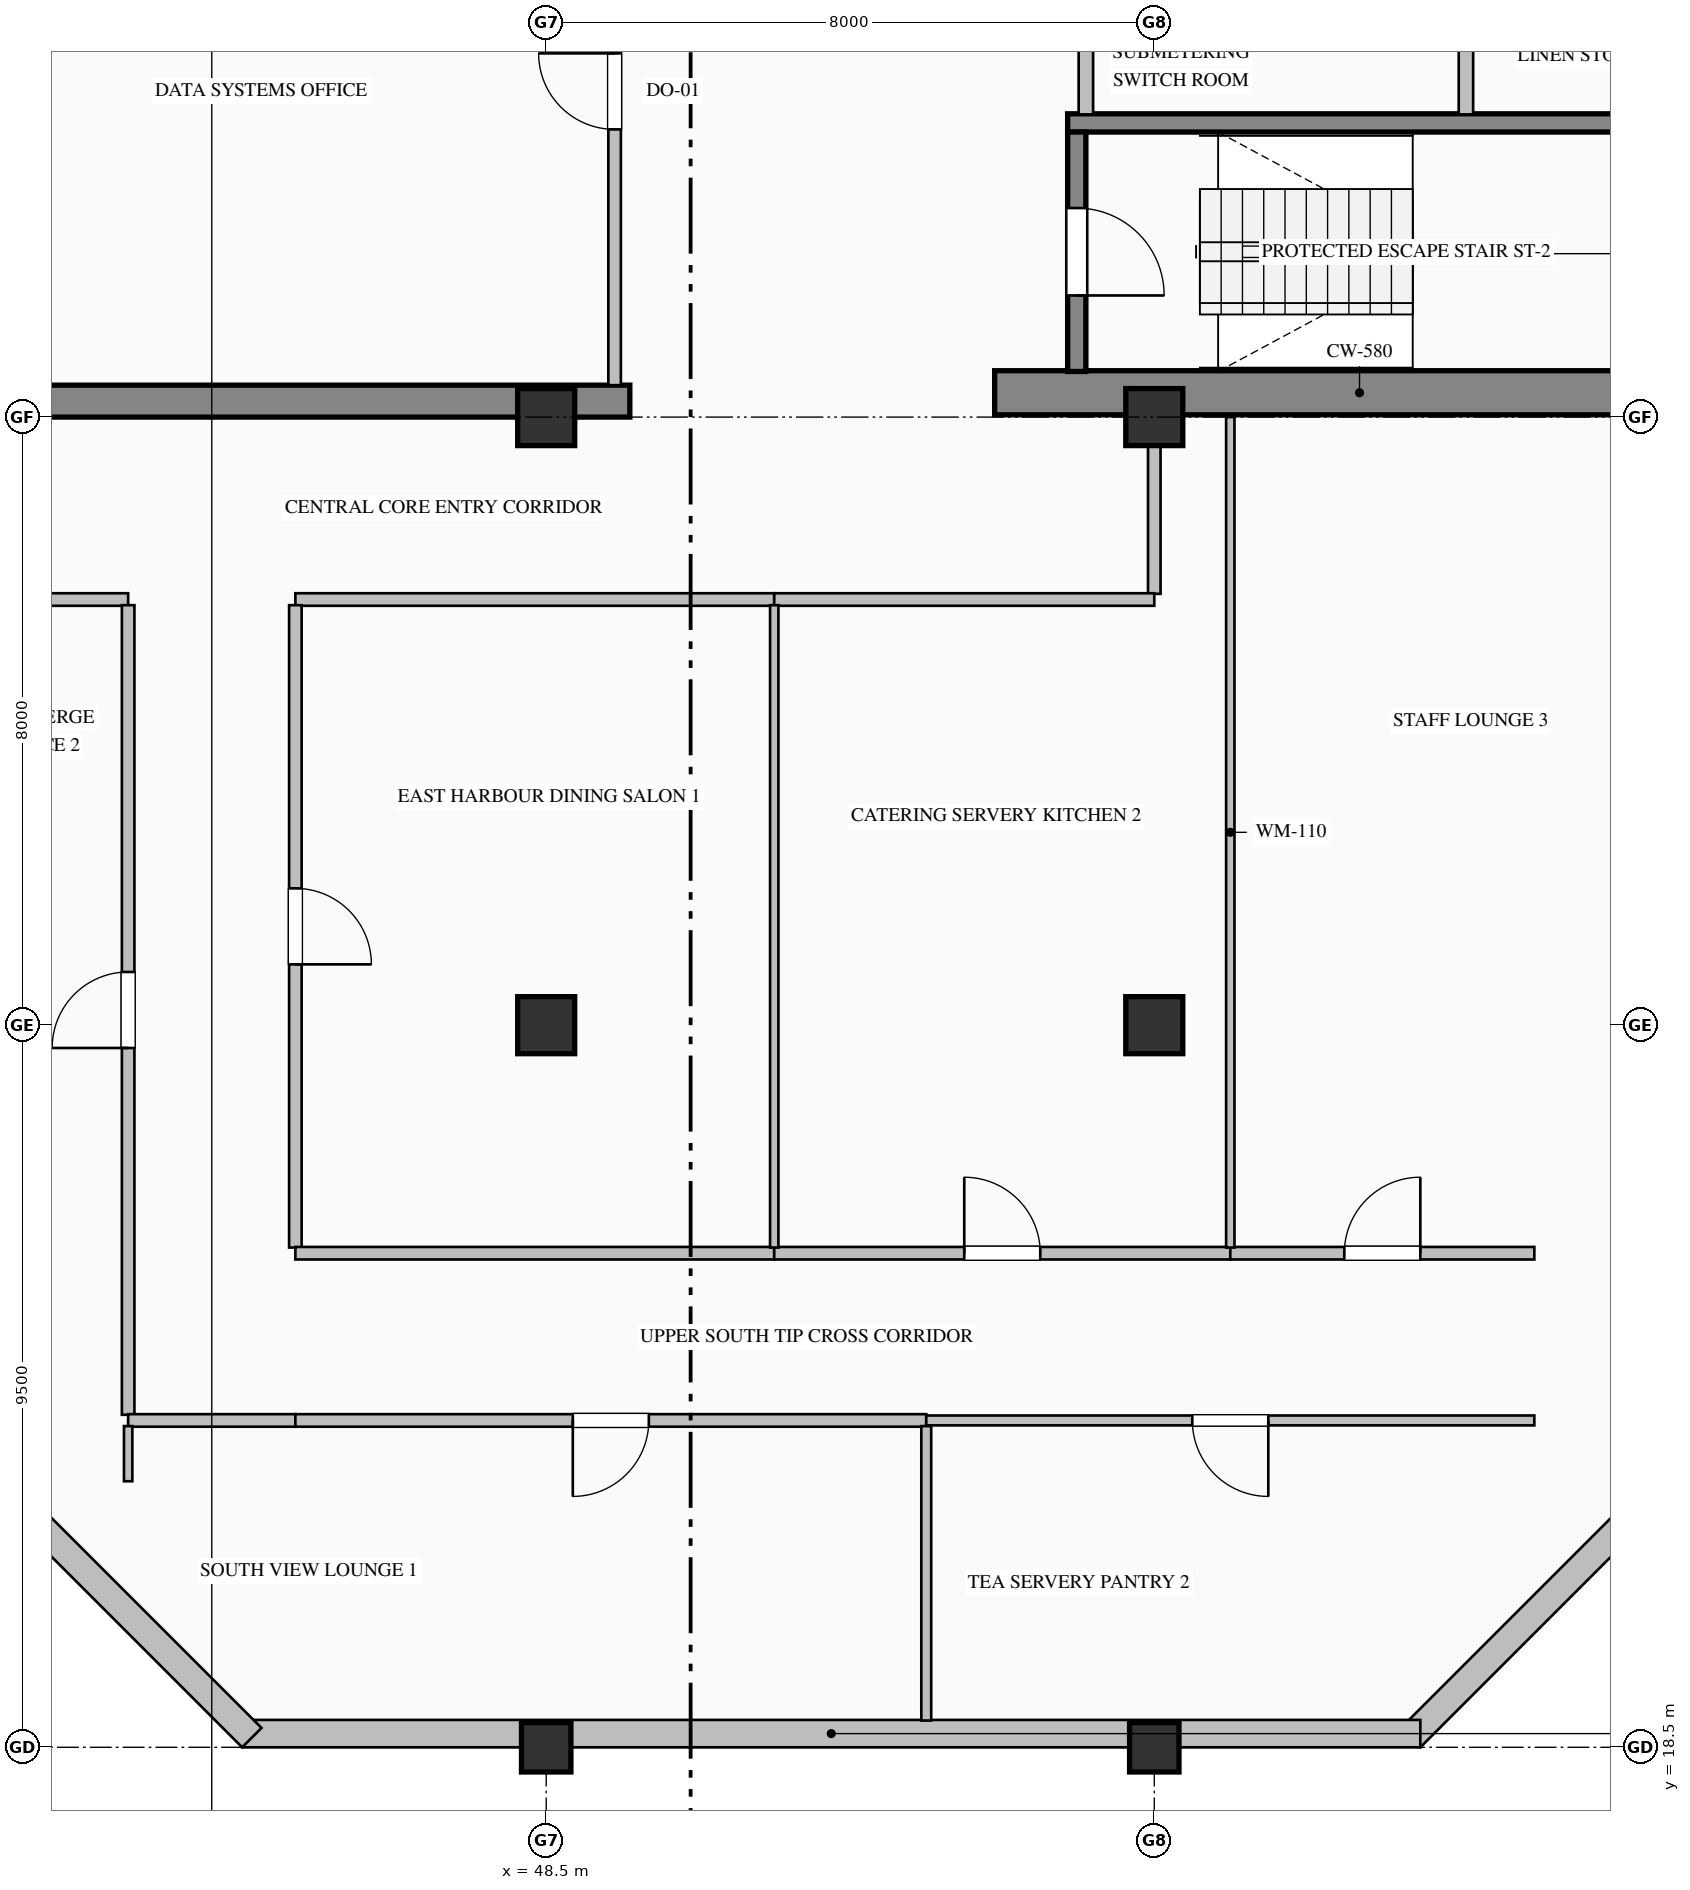
"""IFC4 building model, lengths in metres.
Left out: names, types, materials, properties, quantities, classifications, styles, units other than length and angle.
Written with IfcOpenShell. Run it as: python <this file> out.ifc"""

import sys

from ifc_helpers import new_model, si_unit, direction, frame, frame_2d, origin, origin_2d, place, context, subcontext, project, spatial, rectangle, hollow_rectangle, extrude, element, fill, save


model = new_model("IFC4")
c1 = context("Model", 3, precision=1e-05, world=origin(), true_north=direction((0.0, 1.0)))
c2 = subcontext(c1, "Body", "Model", "MODEL_VIEW")
j1 = project(units=[si_unit("LENGTHUNIT", "METRE"), si_unit("PLANEANGLEUNIT", "RADIAN")], contexts=[c1])
p1 = place(None, origin())
s1 = spatial("IfcSite", under=j1, at=p1, CompositionType="ELEMENT")
p2 = place(p1, origin())
s2 = spatial("IfcBuilding", under=s1, at=p2, CompositionType="ELEMENT")
p3 = place(p2, frame((0.0, 0.0, 327.2)))
s3 = spatial("IfcBuildingStorey", under=s2, at=p3, CompositionType="ELEMENT", Elevation=327.2)
p4 = place(p3, frame((40.5, 36.21, 0.0), z_axis=(0.0, 0.0, 1.0), x_axis=(1.0, 0.0, 0.0)))
e1 = element("IfcWall", 1, at=p4, inside=s3, PredefinedType="SHEAR", context=c2, shape_type="SweptSolid", body=[
    extrude(rectangle(XDim=9.1, YDim=0.42, at=frame_2d((4.55, 0.0))), origin(), (0.0, 0.0, 1.0), 3.785),
])
p5 = place(p3, frame((54.4, 36.32, 0.0), z_axis=(0.0, 0.0, 1.0), x_axis=(1.0, 0.0, 0.0)))
e2 = element("IfcWall", 2, at=p5, inside=s3, PredefinedType="SHEAR", context=c2, shape_type="SweptSolid", body=[
    extrude(rectangle(XDim=9.6, YDim=0.58, at=frame_2d((4.8, 0.0))), origin(), (0.0, 0.0, 1.0), 4.0),
])
p6 = place(p3, frame((48.5, 18.5, 0.0), z_axis=(0.0, 0.0, 1.0), x_axis=(1.0, 0.0, 0.0)))
e3 = element("IfcColumn", 3, at=p6, inside=s3, PredefinedType="COLUMN", context=c2, shape_type="SweptSolid", body=[
    extrude(hollow_rectangle(XDim=0.65, YDim=0.65, WallThickness=0.028, at=origin_2d()), origin(), (0.0, 0.0, 1.0), 4.0),
])
for number, where, z_axis, x_axis in (
    (4, (48.5, 28.0, 0.0), (0.0, 0.0, 1.0), (1.0, 0.0, 0.0)),
    (5, (48.5, 36.0, 0.0), (0.0, 0.0, 1.0), (1.0, 0.0, 0.0)),
):
    element("IfcColumn", number, at=place(p3, frame(where, z_axis=z_axis, x_axis=x_axis)), inside=s3, PredefinedType="COLUMN", context=c2, shape_type="SweptSolid", body=[
        extrude(rectangle(XDim=0.75, YDim=0.75, at=origin_2d()), origin(), (0.0, 0.0, 1.0), 4.0),
    ])
p7 = place(p3, frame((56.5, 18.5, 0.0), z_axis=(0.0, 0.0, 1.0), x_axis=(1.0, 0.0, 0.0)))
e6 = element("IfcColumn", 6, at=p7, inside=s3, PredefinedType="COLUMN", context=c2, shape_type="SweptSolid", body=[
    extrude(hollow_rectangle(XDim=0.65, YDim=0.65, WallThickness=0.028, at=origin_2d()), origin(), (0.0, 0.0, 1.0), 4.0),
])
for number, where, z_axis, x_axis in (
    (7, (56.5, 28.0, 0.0), (0.0, 0.0, 1.0), (1.0, 0.0, 0.0)),
    (8, (56.5, 36.0, 0.0), (0.0, 0.0, 1.0), (1.0, 0.0, 0.0)),
):
    element("IfcColumn", number, at=place(p3, frame(where, z_axis=z_axis, x_axis=x_axis)), inside=s3, PredefinedType="COLUMN", context=c2, shape_type="SweptSolid", body=[
        extrude(rectangle(XDim=0.75, YDim=0.75, at=origin_2d()), origin(), (0.0, 0.0, 1.0), 4.0),
    ])
p8 = place(p3, frame((63.873, 22.627, 0.0), z_axis=(0.0, 0.0, 1.0), x_axis=(-0.707106781187, -0.707106781187, 0.0)))
e9 = element("IfcWall", 9, at=p8, inside=s3, PredefinedType="SOLIDWALL", context=c2, shape_type="SweptSolid", body=[
    extrude(rectangle(XDim=5.657, YDim=0.36, at=frame_2d((2.828, 0.0))), origin(), (0.0, 0.0, 1.0), 3.785),
])
p9 = place(p3, frame((60.0, 18.68, 0.0), z_axis=(0.0, 0.0, 1.0), x_axis=(-1.0, 0.0, 0.0)))
e10 = element("IfcWall", 10, at=p9, inside=s3, PredefinedType="SOLIDWALL", context=c2, shape_type="SweptSolid", body=[
    extrude(rectangle(XDim=15.5, YDim=0.36, at=frame_2d((7.75, 0.0))), origin(), (0.0, 0.0, 1.0), 3.335),
])
p10 = place(p3, frame((44.627, 18.627, 0.0), z_axis=(0.0, 0.0, 1.0), x_axis=(-0.707106781187, 0.707106781187, 0.0)))
e11 = element("IfcWall", 11, at=p10, inside=s3, PredefinedType="SOLIDWALL", context=c2, shape_type="SweptSolid", body=[
    extrude(rectangle(XDim=5.657, YDim=0.36, at=frame_2d((2.828, 0.0))), origin(), (0.0, 0.0, 1.0), 3.785),
])
p11 = place(p3, frame((55.36, 39.87, 0.0), z_axis=(0.0, 0.0, 1.0), x_axis=(1.0, 0.0, 0.0)))
e12 = element("IfcWall", 12, at=p11, inside=s3, PredefinedType="SOLIDWALL", context=c2, shape_type="SweptSolid", body=[
    extrude(rectangle(XDim=8.08, YDim=0.24, at=frame_2d((4.04, 0.0))), origin(), (0.0, 0.0, 1.0), 4.0),
])
p12 = place(p3, frame((55.48, 39.75, 0.0), z_axis=(0.0, 0.0, 1.0), x_axis=(0.0, -1.0, 0.0)))
e13 = element("IfcWall", 13, at=p12, inside=s3, PredefinedType="SOLIDWALL", context=c2, shape_type="SweptSolid", body=[
    extrude(rectangle(XDim=3.15, YDim=0.24, at=frame_2d((1.575, 0.0))), origin(), (0.0, 0.0, 1.0), 4.0),
])
p13 = place(p12, frame((1.0, 0.0, 0.0)))
e14 = element("IfcOpeningElement", 14, at=p13, cuts=e13, PredefinedType="OPENING", context=c2, shape_type="SweptSolid", body=[
    extrude(rectangle(XDim=1.15, YDim=2.2, at=frame_2d((0.575, 1.1))), frame((0.0, 0.13, 0.0), z_axis=(0.0, -1.0, 0.0), x_axis=(1.0, 0.0, 0.0)), (0.0, 0.0, 1.0), 0.26),
])
p14 = place(p3, frame((49.4, 36.42, 0.0), z_axis=(0.0, 0.0, 1.0), x_axis=(0.0, 1.0, 0.0)))
e15 = element("IfcWall", 15, at=p14, inside=s3, PredefinedType="PARTITIONING", context=c2, shape_type="SweptSolid", body=[
    extrude(rectangle(XDim=7.73, YDim=0.165, at=frame_2d((3.865, 0.0))), origin(), (0.0, 0.0, 1.0), 3.027),
])
p15 = place(p14, frame((3.365, 0.0, 0.0)))
e16 = element("IfcOpeningElement", 16, at=p15, cuts=e15, PredefinedType="OPENING", context=c2, shape_type="SweptSolid", body=[
    extrude(rectangle(XDim=1.0, YDim=2.15, at=frame_2d((0.5, 1.075))), frame((0.0, 0.093, 0.0), z_axis=(0.0, -1.0, 0.0), x_axis=(1.0, 0.0, 0.0)), (0.0, 0.0, 1.0), 0.185),
])
for number, where, z_axis, x_axis in (
    (17, (55.6, 42.713, 0.0), (0.0, 0.0, 1.0), (0.0, -1.0, 0.0)),
    (18, (60.6, 42.713, 0.0), (0.0, 0.0, 1.0), (0.0, -1.0, 0.0)),
):
    element("IfcWall", number, at=place(p3, frame(where, z_axis=z_axis, x_axis=x_axis)), inside=s3, PredefinedType="PARTITIONING", context=c2, shape_type="SweptSolid", body=[
        extrude(rectangle(XDim=2.731, YDim=0.19, at=frame_2d((1.365, 0.0))), origin(), (0.0, 0.0, 1.0), 3.785),
    ])
p16 = place(p3, frame((51.5, 33.6, 0.0), z_axis=(0.0, 0.0, 1.0), x_axis=(-1.0, 0.0, 0.0)))
e19 = element("IfcWall", 19, at=p16, inside=s3, PredefinedType="PARTITIONING", context=c2, shape_type="SweptSolid", body=[
    extrude(rectangle(XDim=6.3, YDim=0.165, at=frame_2d((3.15, 0.0))), origin(), (0.0, 0.0, 1.0), 3.785),
])
p17 = place(p3, frame((56.5, 36.0, 0.0), z_axis=(0.0, 0.0, 1.0), x_axis=(0.0, -1.0, 0.0)))
e20 = element("IfcWall", 20, at=p17, inside=s3, PredefinedType="PARTITIONING", context=c2, shape_type="SweptSolid", body=[
    extrude(rectangle(XDim=2.325, YDim=0.165, at=frame_2d((1.163, 0.0))), origin(), (0.0, 0.0, 1.0), 3.177),
])
p18 = place(p3, frame((56.5, 33.6, 0.0), z_axis=(0.0, 0.0, 1.0), x_axis=(-1.0, 0.0, 0.0)))
e21 = element("IfcWall", 21, at=p18, inside=s3, PredefinedType="PARTITIONING", context=c2, shape_type="SweptSolid", body=[
    extrude(rectangle(XDim=5.0, YDim=0.165, at=frame_2d((2.5, 0.0))), origin(), (0.0, 0.0, 1.0), 3.785),
])
p19 = place(p3, frame((43.0, 33.6, 0.0), z_axis=(0.0, 0.0, 1.0), x_axis=(-1.0, 0.0, 0.0)))
e22 = element("IfcWall", 22, at=p19, inside=s3, PredefinedType="PARTITIONING", context=c2, shape_type="SweptSolid", body=[
    extrude(rectangle(XDim=2.5, YDim=0.165, at=frame_2d((1.25, 0.0))), origin(), (0.0, 0.0, 1.0), 3.785),
])
p20 = place(p3, frame((45.2, 33.525, 0.0), z_axis=(0.0, 0.0, 1.0), x_axis=(0.0, -1.0, 0.0)))
e23 = element("IfcWall", 23, at=p20, inside=s3, PredefinedType="PARTITIONING", context=c2, shape_type="SweptSolid", body=[
    extrude(rectangle(XDim=8.451, YDim=0.165, at=frame_2d((4.226, 0.0))), origin(), (0.0, 0.0, 1.0), 3.785),
])
p21 = place(p20, frame((3.726, 0.0, 0.0)))
e24 = element("IfcOpeningElement", 24, at=p21, cuts=e23, PredefinedType="OPENING", context=c2, shape_type="SweptSolid", body=[
    extrude(rectangle(XDim=1.0, YDim=2.15, at=frame_2d((0.5, 1.075))), frame((0.0, 0.093, 0.0), z_axis=(0.0, -1.0, 0.0), x_axis=(1.0, 0.0, 0.0)), (0.0, 0.0, 1.0), 0.185),
])
p22 = place(p3, frame((43.0, 22.875, 0.0), z_axis=(0.0, 0.0, 1.0), x_axis=(0.0, 1.0, 0.0)))
e25 = element("IfcWall", 25, at=p22, inside=s3, PredefinedType="PARTITIONING", context=c2, shape_type="SweptSolid", body=[
    extrude(rectangle(XDim=10.651, YDim=0.165, at=frame_2d((5.325, 0.0))), origin(), (0.0, 0.0, 1.0), 3.785),
])
p23 = place(p22, frame((4.825, 0.0, 0.0)))
e26 = element("IfcOpeningElement", 26, at=p23, cuts=e25, PredefinedType="OPENING", context=c2, shape_type="SweptSolid", body=[
    extrude(rectangle(XDim=1.0, YDim=2.15, at=frame_2d((0.5, 1.075))), frame((0.0, 0.093, 0.0), z_axis=(0.0, -1.0, 0.0), x_axis=(1.0, 0.0, 0.0)), (0.0, 0.0, 1.0), 0.185),
])
p24 = place(p3, frame((45.2, 22.8, 0.0), z_axis=(0.0, 0.0, 1.0), x_axis=(-1.0, 0.0, 0.0)))
e27 = element("IfcWall", 27, at=p24, inside=s3, PredefinedType="PARTITIONING", context=c2, shape_type="SweptSolid", body=[
    extrude(rectangle(XDim=2.2, YDim=0.165, at=frame_2d((1.1, 0.0))), origin(), (0.0, 0.0, 1.0), 3.785),
])
p25 = place(p3, frame((45.2, 25.0, 0.0), z_axis=(0.0, 0.0, 1.0), x_axis=(1.0, 0.0, 0.0)))
e28 = element("IfcWall", 28, at=p25, inside=s3, PredefinedType="PARTITIONING", context=c2, shape_type="SweptSolid", body=[
    extrude(rectangle(XDim=6.3, YDim=0.165, at=frame_2d((3.15, 0.0))), origin(), (0.0, 0.0, 1.0), 3.785),
])
p26 = place(p3, frame((51.5, 25.0, 0.0), z_axis=(0.0, 0.0, 1.0), x_axis=(1.0, 0.0, 0.0)))
e29 = element("IfcWall", 29, at=p26, inside=s3, PredefinedType="PARTITIONING", context=c2, shape_type="SweptSolid", body=[
    extrude(rectangle(XDim=6.0, YDim=0.165, at=frame_2d((3.0, 0.0))), origin(), (0.0, 0.0, 1.0), 3.785),
])
p27 = place(p26, frame((2.5, 0.0, 0.0)))
e30 = element("IfcOpeningElement", 30, at=p27, cuts=e29, PredefinedType="OPENING", context=c2, shape_type="SweptSolid", body=[
    extrude(rectangle(XDim=1.0, YDim=2.15, at=frame_2d((0.5, 1.075))), frame((0.0, 0.093, 0.0), z_axis=(0.0, -1.0, 0.0), x_axis=(1.0, 0.0, 0.0)), (0.0, 0.0, 1.0), 0.185),
])
p28 = place(p3, frame((57.5, 25.0, 0.0), z_axis=(0.0, 0.0, 1.0), x_axis=(1.0, 0.0, 0.0)))
e31 = element("IfcWall", 31, at=p28, inside=s3, PredefinedType="PARTITIONING", context=c2, shape_type="SweptSolid", body=[
    extrude(rectangle(XDim=4.0, YDim=0.165, at=frame_2d((2.0, 0.0))), origin(), (0.0, 0.0, 1.0), 3.785),
])
p29 = place(p28, frame((1.5, 0.0, 0.0)))
e32 = element("IfcOpeningElement", 32, at=p29, cuts=e31, PredefinedType="OPENING", context=c2, shape_type="SweptSolid", body=[
    extrude(rectangle(XDim=1.0, YDim=2.15, at=frame_2d((0.5, 1.075))), frame((0.0, 0.093, 0.0), z_axis=(0.0, -1.0, 0.0), x_axis=(1.0, 0.0, 0.0)), (0.0, 0.0, 1.0), 0.185),
])
p30 = place(p3, frame((53.5, 22.8, 0.0), z_axis=(0.0, 0.0, 1.0), x_axis=(-1.0, 0.0, 0.0)))
e33 = element("IfcWall", 33, at=p30, inside=s3, PredefinedType="PARTITIONING", context=c2, shape_type="SweptSolid", body=[
    extrude(rectangle(XDim=8.3, YDim=0.165, at=frame_2d((4.15, 0.0))), origin(), (0.0, 0.0, 1.0), 3.785),
])
p31 = place(p30, frame((3.65, 0.0, 0.0)))
e34 = element("IfcOpeningElement", 34, at=p31, cuts=e33, PredefinedType="OPENING", context=c2, shape_type="SweptSolid", body=[
    extrude(rectangle(XDim=1.0, YDim=2.15, at=frame_2d((0.5, 1.075))), frame((0.0, 0.093, 0.0), z_axis=(0.0, -1.0, 0.0), x_axis=(1.0, 0.0, 0.0)), (0.0, 0.0, 1.0), 0.185),
])
p32 = place(p3, frame((61.5, 22.8, 0.0), z_axis=(0.0, 0.0, 1.0), x_axis=(-1.0, 0.0, 0.0)))
e35 = element("IfcWall", 35, at=p32, inside=s3, PredefinedType="PARTITIONING", context=c2, shape_type="SweptSolid", body=[
    extrude(rectangle(XDim=8.0, YDim=0.13, at=frame_2d((4.0, 0.0))), origin(), (0.0, 0.0, 1.0), 3.785),
])
p33 = place(p32, frame((3.5, 0.0, 0.0)))
e36 = element("IfcOpeningElement", 36, at=p33, cuts=e35, PredefinedType="OPENING", context=c2, shape_type="SweptSolid", body=[
    extrude(rectangle(XDim=1.0, YDim=2.15, at=frame_2d((0.5, 1.075))), frame((0.0, 0.075, 0.0), z_axis=(0.0, -1.0, 0.0), x_axis=(1.0, 0.0, 0.0)), (0.0, 0.0, 1.0), 0.15),
])
p34 = place(p3, frame((51.5, 33.525, 0.0), z_axis=(0.0, 0.0, 1.0), x_axis=(0.0, -1.0, 0.0)))
e37 = element("IfcWall", 37, at=p34, inside=s3, PredefinedType="MOVABLE", context=c2, shape_type="SweptSolid", body=[
    extrude(rectangle(XDim=8.451, YDim=0.11, at=frame_2d((4.226, 0.0))), origin(), (0.0, 0.0, 1.0), 3.785),
])
p35 = place(p3, frame((57.5, 36.0, 0.0), z_axis=(0.0, 0.0, 1.0), x_axis=(0.0, -1.0, 0.0)))
e38 = element("IfcWall", 38, at=p35, inside=s3, PredefinedType="MOVABLE", context=c2, shape_type="SweptSolid", body=[
    extrude(rectangle(XDim=10.926, YDim=0.11, at=frame_2d((5.463, 0.0))), origin(), (0.0, 0.0, 1.0), 3.785),
])
p36 = place(p3, frame((43.0, 22.726, 0.0), z_axis=(0.0, 0.0, 1.0), x_axis=(0.0, -1.0, 0.0)))
e39 = element("IfcWall", 39, at=p36, inside=s3, PredefinedType="MOVABLE", context=c2, shape_type="SweptSolid", body=[
    extrude(rectangle(XDim=0.726, YDim=0.11, at=frame_2d((0.363, 0.0))), origin(), (0.0, 0.0, 1.0), 3.785),
])
p37 = place(p3, frame((53.5, 22.726, 0.0), z_axis=(0.0, 0.0, 1.0), x_axis=(0.0, -1.0, 0.0)))
e40 = element("IfcWall", 40, at=p37, inside=s3, PredefinedType="PARTITIONING", context=c2, shape_type="SweptSolid", body=[
    extrude(rectangle(XDim=3.874, YDim=0.13, at=frame_2d((1.937, 0.0))), origin(), (0.0, 0.0, 1.0), 3.785),
])
p38 = place(p13, origin())
e41 = element("IfcDoor", 41, at=p38, inside=s3, OperationType="SINGLE_SWING_RIGHT", PredefinedType="DOOR", context=c2, shape_type="SweptSolid", body=[
    extrude(rectangle(XDim=1.15, YDim=2.2, at=frame_2d((0.575, 1.1))), frame((0.0, 0.025, 0.0), z_axis=(0.0, -1.0, 0.0), x_axis=(1.0, 0.0, 0.0)), (0.0, 0.0, 1.0), 0.05),
])
fill(e14, e41)
p39 = place(p15, origin())
e42 = element("IfcDoor", 42, at=p39, inside=s3, OperationType="SINGLE_SWING_RIGHT", PredefinedType="DOOR", context=c2, shape_type="SweptSolid", body=[
    extrude(rectangle(XDim=1.0, YDim=2.15, at=frame_2d((0.5, 1.075))), frame((0.0, 0.025, 0.0), z_axis=(0.0, -1.0, 0.0), x_axis=(1.0, 0.0, 0.0)), (0.0, 0.0, 1.0), 0.05),
])
fill(e16, e42)
p40 = place(p21, origin())
e43 = element("IfcDoor", 43, at=p40, inside=s3, OperationType="SINGLE_SWING_RIGHT", PredefinedType="DOOR", context=c2, shape_type="SweptSolid", body=[
    extrude(rectangle(XDim=1.0, YDim=2.15, at=frame_2d((0.5, 1.075))), frame((0.0, 0.025, 0.0), z_axis=(0.0, -1.0, 0.0), x_axis=(1.0, 0.0, 0.0)), (0.0, 0.0, 1.0), 0.05),
])
fill(e24, e43)
p41 = place(p27, origin())
e44 = element("IfcDoor", 44, at=p41, inside=s3, OperationType="SINGLE_SWING_LEFT", PredefinedType="DOOR", context=c2, shape_type="SweptSolid", body=[
    extrude(rectangle(XDim=1.0, YDim=2.15, at=frame_2d((0.5, 1.075))), frame((0.0, 0.025, 0.0), z_axis=(0.0, -1.0, 0.0), x_axis=(1.0, 0.0, 0.0)), (0.0, 0.0, 1.0), 0.05),
])
fill(e30, e44)
p42 = place(p29, origin())
e45 = element("IfcDoor", 45, at=p42, inside=s3, OperationType="SINGLE_SWING_RIGHT", PredefinedType="DOOR", context=c2, shape_type="SweptSolid", body=[
    extrude(rectangle(XDim=1.0, YDim=2.15, at=frame_2d((0.5, 1.075))), frame((0.0, 0.025, 0.0), z_axis=(0.0, -1.0, 0.0), x_axis=(1.0, 0.0, 0.0)), (0.0, 0.0, 1.0), 0.05),
])
fill(e32, e45)
p43 = place(p23, origin())
e46 = element("IfcDoor", 46, at=p43, inside=s3, OperationType="SINGLE_SWING_LEFT", PredefinedType="DOOR", context=c2, shape_type="SweptSolid", body=[
    extrude(rectangle(XDim=1.0, YDim=2.15, at=frame_2d((0.5, 1.075))), frame((0.0, 0.025, 0.0), z_axis=(0.0, -1.0, 0.0), x_axis=(1.0, 0.0, 0.0)), (0.0, 0.0, 1.0), 0.05),
])
fill(e26, e46)
p44 = place(p31, origin())
e47 = element("IfcDoor", 47, at=p44, inside=s3, OperationType="SINGLE_SWING_RIGHT", PredefinedType="DOOR", context=c2, shape_type="SweptSolid", body=[
    extrude(rectangle(XDim=1.0, YDim=2.15, at=frame_2d((0.5, 1.075))), frame((0.0, 0.025, 0.0), z_axis=(0.0, -1.0, 0.0), x_axis=(1.0, 0.0, 0.0)), (0.0, 0.0, 1.0), 0.05),
])
fill(e34, e47)
p45 = place(p33, origin())
e48 = element("IfcDoor", 48, at=p45, inside=s3, OperationType="SINGLE_SWING_LEFT", PredefinedType="DOOR", context=c2, shape_type="SweptSolid", body=[
    extrude(rectangle(XDim=1.0, YDim=2.15, at=frame_2d((0.5, 1.075))), frame((0.0, 0.025, 0.0), z_axis=(0.0, -1.0, 0.0), x_axis=(1.0, 0.0, 0.0)), (0.0, 0.0, 1.0), 0.05),
])
fill(e36, e48)
save(model, sys.argv[1])
